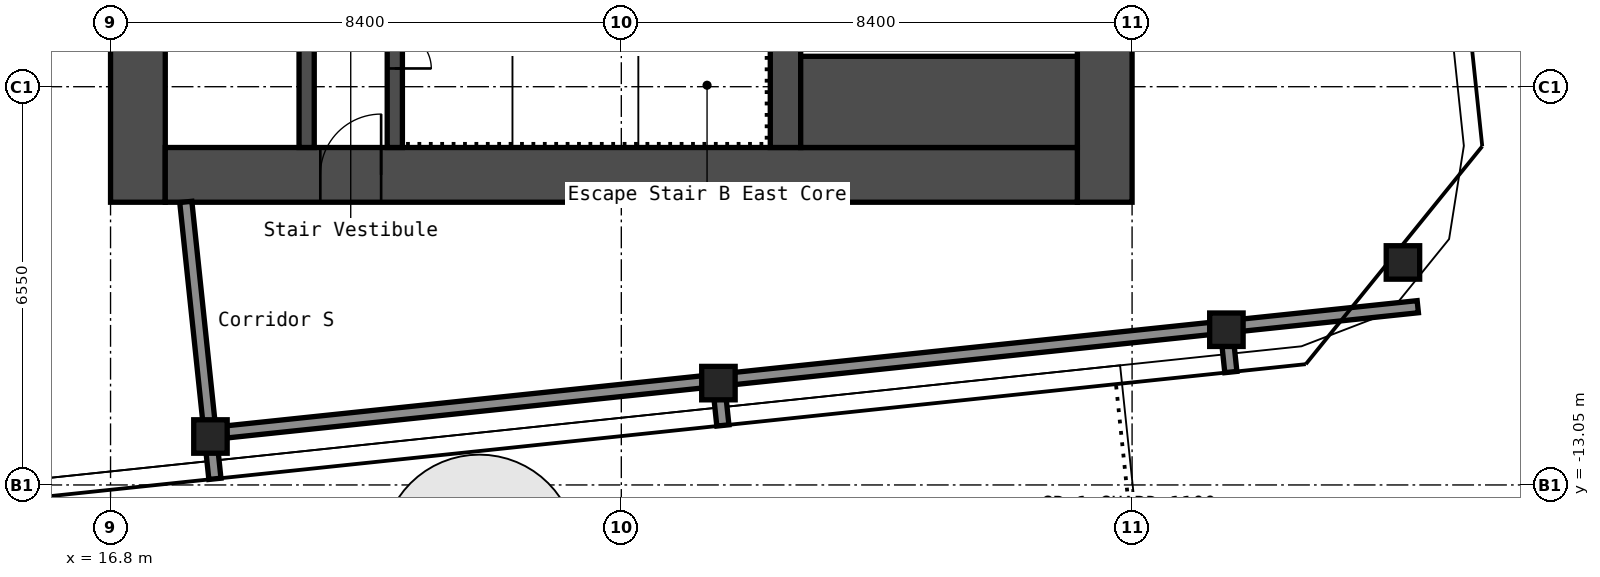
"""IFC4 building model, lengths in metres.
Left out: names, types, materials, properties, quantities, classifications, styles, units other than length and angle.
Written with IfcOpenShell. Run it as: python <this file> out.ifc"""

import sys

from ifc_helpers import new_model, si_unit, direction, frame, frame_2d, origin, origin_2d, place, context, subcontext, project, spatial, rectangle, hollow_rectangle, extrude, element, fill, save


model = new_model("IFC4")
c1 = context("Model", 3, precision=1e-05, world=origin(), true_north=direction((0.0, 1.0)))
c2 = subcontext(c1, "Body", "Model", "MODEL_VIEW")
j1 = project(units=[si_unit("LENGTHUNIT", "METRE"), si_unit("PLANEANGLEUNIT", "RADIAN")], contexts=[c1])
p1 = place(None, origin())
s1 = spatial("IfcSite", under=j1, at=p1, CompositionType="ELEMENT")
p2 = place(p1, origin())
s2 = spatial("IfcBuilding", under=s1, at=p2, CompositionType="ELEMENT")
p3 = place(p2, frame((0.0, 0.0, 258.2)))
s3 = spatial("IfcBuildingStorey", under=s2, at=p3, CompositionType="ELEMENT", Elevation=258.2)
for number, where, z_axis, x_axis in (
    (1, (18.443, -12.253, 0.0), (0.0, 0.0, 1.0), (1.0, 0.0, 0.0)),
    (2, (26.797, -11.375, 0.0), (0.0, 0.0, 1.0), (1.0, 0.0, 0.0)),
    (3, (35.151, -10.497, 0.0), (0.0, 0.0, 1.0), (1.0, 0.0, 0.0)),
    (4, (38.054, -9.39, 0.0), (0.0, 0.0, 1.0), (1.0, 0.0, 0.0)),
):
    element("IfcColumn", number, at=place(p3, frame(where, z_axis=z_axis, x_axis=x_axis)), inside=s3, PredefinedType="COLUMN", context=c2, shape_type="SweptSolid", body=[
        extrude(hollow_rectangle(XDim=0.55, YDim=0.55, WallThickness=0.022, InnerFilletRadius=0.033, OuterFilletRadius=0.055, at=origin_2d()), origin(), (0.0, 0.0, 1.0), 2.75),
    ])
p4 = place(p3, frame((17.25, -8.4, 0.0), z_axis=(0.0, 0.0, 1.0), x_axis=(0.0, 1.0, 0.0)))
e5 = element("IfcWall", 5, at=p4, inside=s3, PredefinedType="SHEAR", context=c2, shape_type="SweptSolid", body=[
    extrude(rectangle(XDim=16.8, YDim=0.9, at=frame_2d((8.4, 0.0))), origin(), (0.0, 0.0, 1.0), 2.75),
])
p5 = place(p4, frame((11.879, 0.0, 0.0)))
e6 = element("IfcOpeningElement", 6, at=p5, cuts=e5, PredefinedType="OPENING", context=c2, shape_type="SweptSolid", body=[
    extrude(rectangle(XDim=1.6, YDim=2.1, at=frame_2d((0.8, 1.05))), frame((0.0, 0.46, 0.0), z_axis=(0.0, -1.0, 0.0), x_axis=(1.0, 0.0, 0.0)), (0.0, 0.0, 1.0), 0.92),
])
p6 = place(p3, frame((33.15, -8.4, 0.0), z_axis=(0.0, 0.0, 1.0), x_axis=(0.0, 1.0, 0.0)))
e7 = element("IfcWall", 7, at=p6, inside=s3, PredefinedType="SHEAR", context=c2, shape_type="SweptSolid", body=[
    extrude(rectangle(XDim=16.8, YDim=0.9, at=frame_2d((8.4, 0.0))), origin(), (0.0, 0.0, 1.0), 2.75),
])
p7 = place(p3, frame((17.7, -7.95, 0.0), z_axis=(0.0, 0.0, 1.0), x_axis=(1.0, 0.0, 0.0)))
e8 = element("IfcWall", 8, at=p7, inside=s3, PredefinedType="SHEAR", context=c2, shape_type="SweptSolid", body=[
    extrude(rectangle(XDim=15.0, YDim=0.9, at=frame_2d((7.5, 0.0))), origin(), (0.0, 0.0, 1.0), 2.75),
])
p8 = place(p7, frame((2.55, 0.0, 0.0)))
e9 = element("IfcOpeningElement", 9, at=p8, cuts=e8, PredefinedType="OPENING", context=c2, shape_type="SweptSolid", body=[
    extrude(rectangle(XDim=1.0, YDim=2.1, at=frame_2d((0.5, 1.05))), frame((0.0, 0.46, 0.0), z_axis=(0.0, -1.0, 0.0), x_axis=(1.0, 0.0, 0.0)), (0.0, 0.0, 1.0), 0.92),
])
p9 = place(p3, frame((20.025, -7.5, 0.0), z_axis=(0.0, 0.0, 1.0), x_axis=(0.0, 1.0, 0.0)))
e10 = element("IfcWall", 10, at=p9, inside=s3, PredefinedType="SHEAR", context=c2, shape_type="SweptSolid", body=[
    extrude(rectangle(XDim=6.3, YDim=0.25, at=frame_2d((3.15, 0.0))), origin(), (0.0, 0.0, 1.0), 2.75),
])
p10 = place(p9, frame((2.4, 0.0, 0.0)))
e11 = element("IfcOpeningElement", 11, at=p10, cuts=e10, PredefinedType="OPENING", context=c2, shape_type="SweptSolid", body=[
    extrude(rectangle(XDim=1.0, YDim=2.1, at=frame_2d((0.5, 1.05))), frame((0.0, 0.135, 0.0), z_axis=(0.0, -1.0, 0.0), x_axis=(1.0, 0.0, 0.0)), (0.0, 0.0, 1.0), 0.27),
])
p11 = place(p3, frame((21.475, -7.5, 0.0), z_axis=(0.0, 0.0, 1.0), x_axis=(0.0, 1.0, 0.0)))
e12 = element("IfcWall", 12, at=p11, inside=s3, PredefinedType="SHEAR", context=c2, shape_type="SweptSolid", body=[
    extrude(rectangle(XDim=3.75, YDim=0.25, at=frame_2d((1.875, 0.0))), origin(), (0.0, 0.0, 1.0), 2.75),
])
p12 = place(p11, frame((1.3, 0.0, 0.0)))
e13 = element("IfcOpeningElement", 13, at=p12, cuts=e12, PredefinedType="OPENING", context=c2, shape_type="SweptSolid", body=[
    extrude(rectangle(XDim=1.2, YDim=2.1, at=frame_2d((0.6, 1.05))), frame((0.0, 0.135, 0.0), z_axis=(0.0, -1.0, 0.0), x_axis=(1.0, 0.0, 0.0)), (0.0, 0.0, 1.0), 0.27),
])
p13 = place(p3, frame((27.9, -7.5, 0.0), z_axis=(0.0, 0.0, 1.0), x_axis=(0.0, 1.0, 0.0)))
e14 = element("IfcWall", 14, at=p13, inside=s3, PredefinedType="SHEAR", context=c2, shape_type="SweptSolid", body=[
    extrude(rectangle(XDim=3.75, YDim=0.5, at=frame_2d((1.875, 0.0))), origin(), (0.0, 0.0, 1.0), 2.75),
])
p14 = place(p3, frame((28.15, -6.75, 0.0), z_axis=(0.0, 0.0, 1.0), x_axis=(1.0, 0.0, 0.0)))
e15 = element("IfcWall", 15, at=p14, inside=s3, PredefinedType="SHEAR", context=c2, shape_type="SweptSolid", body=[
    extrude(rectangle(XDim=4.55, YDim=1.5, at=frame_2d((2.275, 0.0))), origin(), (0.0, 0.0, 1.0), 2.75),
])
p15 = place(p3, frame((18.708, -12.177, 0.0), z_axis=(0.0, 0.0, 1.0), x_axis=(0.994521604238, 0.104531233147, 0.0)))
e16 = element("IfcWall", 16, at=p15, inside=s3, PredefinedType="PARTITIONING", context=c2, shape_type="SweptSolid", body=[
    extrude(rectangle(XDim=19.698, YDim=0.2, at=frame_2d((9.849, 0.0))), origin(), (0.0, 0.0, 1.0), 2.75),
])
p16 = place(p3, frame((18.516, -12.949, 0.0), z_axis=(0.0, 0.0, 1.0), x_axis=(-0.104548796268, 0.994519758074, 0.0)))
e17 = element("IfcWall", 17, at=p16, inside=s3, PredefinedType="PARTITIONING", context=c2, shape_type="SweptSolid", body=[
    extrude(rectangle(XDim=4.579, YDim=0.2, at=frame_2d((2.29, 0.0))), origin(), (0.0, 0.0, 1.0), 2.75),
])
for number, where, z_axis, x_axis in (
    (18, (26.87, -12.071, 0.0), (0.0, 0.0, 1.0), (-0.105, 0.994, 0.0)),
    (19, (35.224, -11.193, 0.0), (0.0, 0.0, 1.0), (-0.105, 0.994, 0.0)),
):
    element("IfcWall", number, at=place(p3, frame(where, z_axis=z_axis, x_axis=x_axis)), inside=s3, PredefinedType="PARTITIONING", context=c2, shape_type="SweptSolid", body=[
        extrude(rectangle(XDim=0.434, YDim=0.2, at=frame_2d((0.217, 0.0))), origin(), (0.0, 0.0, 1.0), 2.75),
    ])
p17 = place(p8, origin())
e20 = element("IfcDoor", 20, at=p17, inside=s3, OperationType="SINGLE_SWING_LEFT", PredefinedType="DOOR", context=c2, shape_type="SweptSolid", body=[
    extrude(rectangle(XDim=1.0, YDim=2.1, at=frame_2d((0.5, 1.05))), frame((0.0, 0.025, 0.0), z_axis=(0.0, -1.0, 0.0), x_axis=(1.0, 0.0, 0.0)), (0.0, 0.0, 1.0), 0.05),
])
fill(e9, e20)
p18 = place(p12, origin())
e21 = element("IfcDoor", 21, at=p18, inside=s3, OperationType="DOUBLE_DOOR_SINGLE_SWING", PredefinedType="DOOR", context=c2, shape_type="SweptSolid", body=[
    extrude(rectangle(XDim=1.2, YDim=2.1, at=frame_2d((0.6, 1.05))), frame((0.0, 0.025, 0.0), z_axis=(0.0, -1.0, 0.0), x_axis=(1.0, 0.0, 0.0)), (0.0, 0.0, 1.0), 0.05),
])
fill(e13, e21)
save(model, sys.argv[1])
